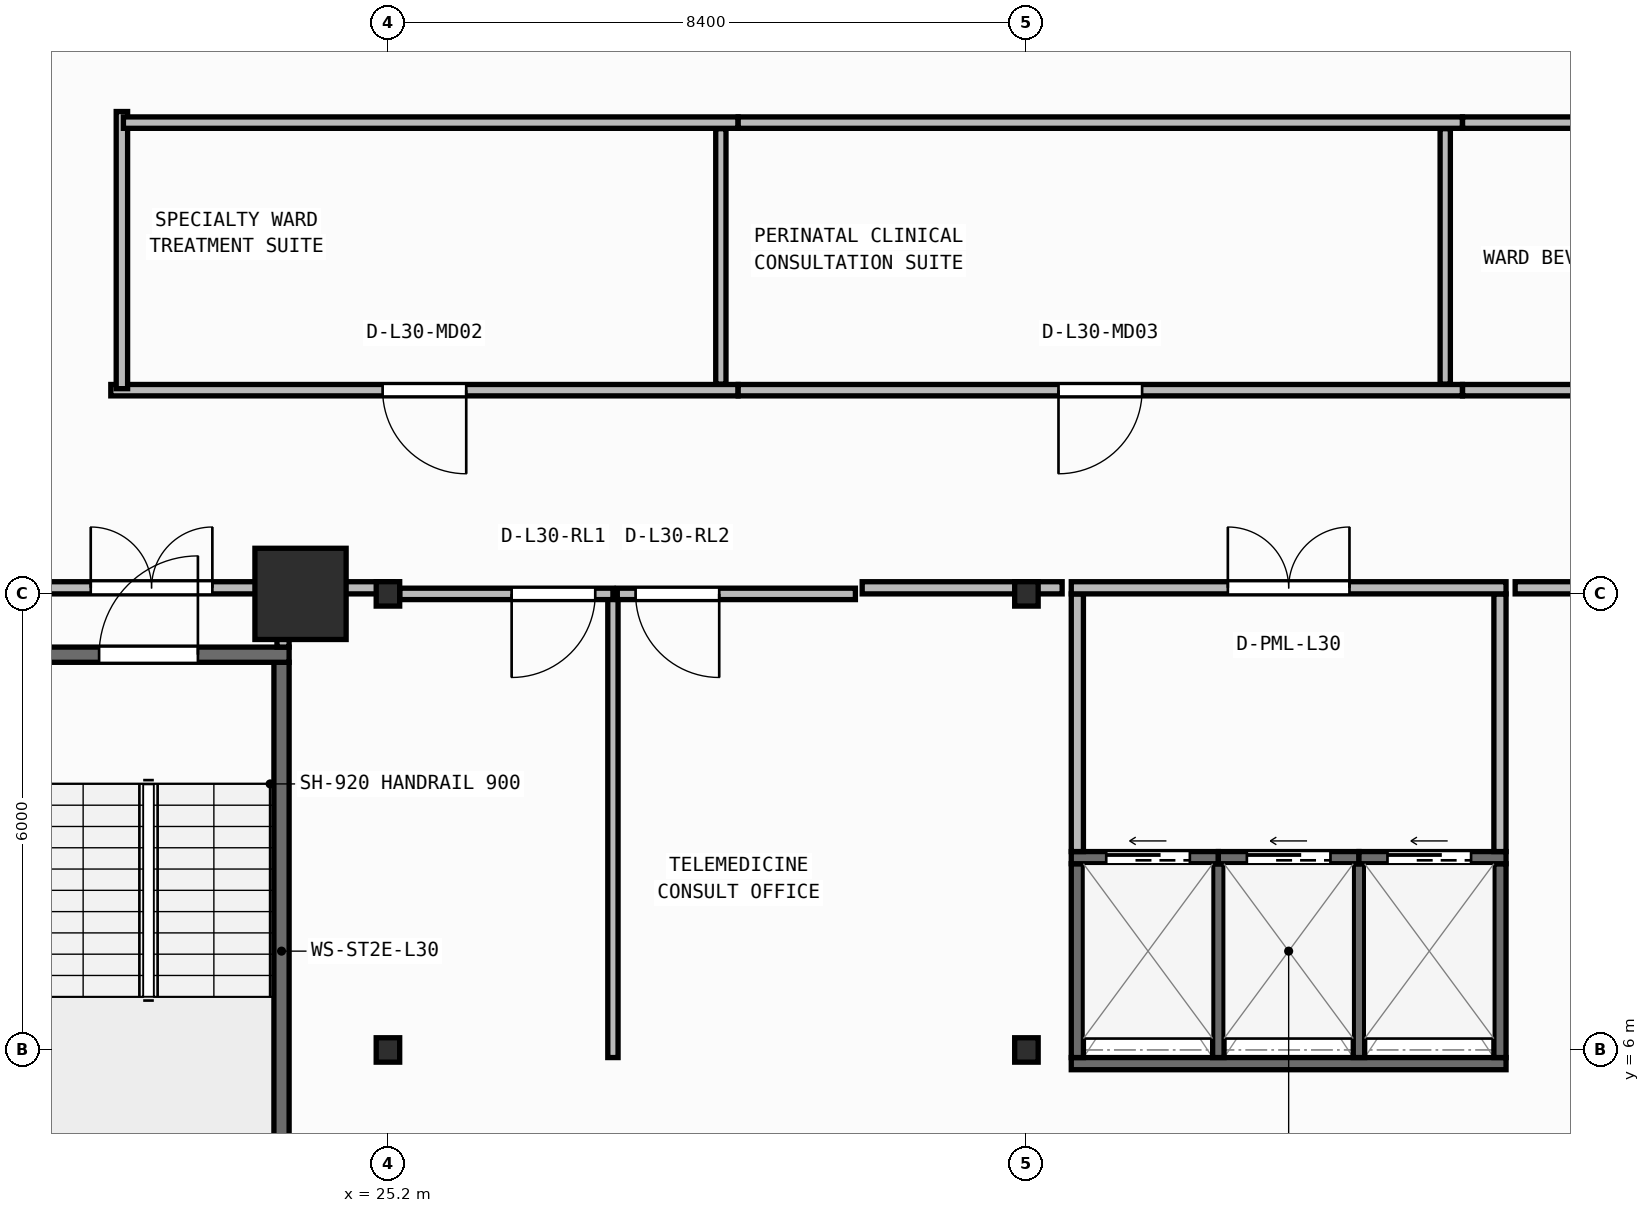
"""IFC4 building model, lengths in metres.
Left out: names, types, materials, properties, quantities, classifications, styles, units other than length and angle.
Written with IfcOpenShell. Run it as: python <this file> out.ifc"""

import sys

from ifc_helpers import new_model, si_unit, direction, frame, frame_2d, origin, origin_2d, place, context, subcontext, project, spatial, rectangle, i_section, extrude, element, fill, save


model = new_model("IFC4")
c1 = context("Model", 3, precision=1e-05, world=origin(), true_north=direction((0.0, 1.0)))
c2 = subcontext(c1, "Body", "Model", "MODEL_VIEW")
j1 = project(units=[si_unit("LENGTHUNIT", "METRE"), si_unit("PLANEANGLEUNIT", "RADIAN")], contexts=[c1])
p1 = place(None, origin())
s1 = spatial("IfcSite", under=j1, at=p1, CompositionType="ELEMENT")
p2 = place(p1, origin())
s2 = spatial("IfcBuilding", under=s1, at=p2, CompositionType="ELEMENT")
p3 = place(p2, frame((0.0, 0.0, 123.1)))
s3 = spatial("IfcBuildingStorey", under=s2, at=p3, CompositionType="ELEMENT", Elevation=123.1)
for number, where, z_axis, x_axis in (
    (1, (25.2, 6.0, 0.0), (0.0, 0.0, 1.0), (1.0, 0.0, 0.0)),
    (2, (33.6, 6.0, 0.0), (0.0, 0.0, 1.0), (1.0, 0.0, 0.0)),
):
    element("IfcColumn", number, at=place(p3, frame(where, z_axis=z_axis, x_axis=x_axis)), inside=s3, PredefinedType="COLUMN", context=c2, shape_type="SweptSolid", body=[
        extrude(i_section(OverallWidth=0.309, OverallDepth=0.321, WebThickness=0.014, FlangeThickness=0.022, FilletRadius=0.017, at=origin_2d()), origin(), (0.0, 0.0, 1.0), 3.95),
    ])
p4 = place(p3, frame((24.05, 12.0, 0.0), z_axis=(0.0, 0.0, 1.0), x_axis=(1.0, 0.0, 0.0)))
e3 = element("IfcColumn", 3, at=p4, inside=s3, PredefinedType="COLUMN", context=c2, shape_type="SweptSolid", body=[
    extrude(rectangle(XDim=1.2, YDim=1.2, at=origin_2d()), origin(), (0.0, 0.0, 1.0), 3.95),
])
for number, where, z_axis, x_axis in (
    (4, (25.2, 12.0, 0.0), (0.0, 0.0, 1.0), (1.0, 0.0, 0.0)),
    (5, (33.6, 12.0, 0.0), (0.0, 0.0, 1.0), (1.0, 0.0, 0.0)),
):
    element("IfcColumn", number, at=place(p3, frame(where, z_axis=z_axis, x_axis=x_axis)), inside=s3, PredefinedType="COLUMN", context=c2, shape_type="SweptSolid", body=[
        extrude(i_section(OverallWidth=0.309, OverallDepth=0.321, WebThickness=0.014, FlangeThickness=0.022, FilletRadius=0.017, at=origin_2d()), origin(), (0.0, 0.0, 1.0), 3.95),
    ])
p5 = place(p3, frame((23.8, 3.5, 0.0), z_axis=(0.0, 0.0, 1.0), x_axis=(0.0, 1.0, 0.0)))
e6 = element("IfcWall", 6, at=p5, inside=s3, PredefinedType="SHEAR", context=c2, shape_type="SweptSolid", body=[
    extrude(rectangle(XDim=7.6, YDim=0.2, at=frame_2d((3.8, 0.0))), origin(), (0.0, 0.0, 1.0), 3.71),
])
p6 = place(p3, frame((20.2, 11.2, 0.0), z_axis=(0.0, 0.0, 1.0), x_axis=(1.0, 0.0, 0.0)))
e7 = element("IfcWall", 7, at=p6, inside=s3, PredefinedType="SHEAR", context=c2, shape_type="SweptSolid", body=[
    extrude(rectangle(XDim=3.7, YDim=0.2, at=frame_2d((1.85, 0.0))), origin(), (0.0, 0.0, 1.0), 3.71),
])
p7 = place(p6, frame((1.2, 0.0, 0.0)))
e8 = element("IfcOpeningElement", 8, at=p7, cuts=e7, PredefinedType="OPENING", context=c2, shape_type="SweptSolid", body=[
    extrude(rectangle(XDim=1.3, YDim=2.15, at=frame_2d((0.65, 1.075))), frame((0.0, 0.11, 0.0), z_axis=(0.0, -1.0, 0.0), x_axis=(1.0, 0.0, 0.0)), (0.0, 0.0, 1.0), 0.22),
])
p8 = place(p3, frame((34.19, 5.82, 0.0), z_axis=(0.0, 0.0, 1.0), x_axis=(1.0, 0.0, 0.0)))
e9 = element("IfcWall", 9, at=p8, inside=s3, PredefinedType="SHEAR", context=c2, shape_type="SweptSolid", body=[
    extrude(rectangle(XDim=5.72, YDim=0.16, at=frame_2d((2.86, 0.0))), origin(), (0.0, 0.0, 1.0), 3.71),
])
for number, where, z_axis, x_axis in (
    (10, (34.27, 5.9, 0.0), (0.0, 0.0, 1.0), (0.0, 1.0, 0.0)),
    (11, (39.83, 5.9, 0.0), (0.0, 0.0, 1.0), (0.0, 1.0, 0.0)),
):
    element("IfcWall", number, at=place(p3, frame(where, z_axis=z_axis, x_axis=x_axis)), inside=s3, PredefinedType="SHEAR", context=c2, shape_type="SweptSolid", body=[
        extrude(rectangle(XDim=2.55, YDim=0.16, at=frame_2d((1.275, 0.0))), origin(), (0.0, 0.0, 1.0), 3.71),
    ])
for number, where, z_axis, x_axis in (
    (12, (36.125, 5.9, 0.0), (0.0, 0.0, 1.0), (0.0, 1.0, 0.0)),
    (13, (37.975, 5.9, 0.0), (0.0, 0.0, 1.0), (0.0, 1.0, 0.0)),
):
    element("IfcWall", number, at=place(p3, frame(where, z_axis=z_axis, x_axis=x_axis)), inside=s3, PredefinedType="SHEAR", context=c2, shape_type="SweptSolid", body=[
        extrude(rectangle(XDim=2.55, YDim=0.15, at=frame_2d((1.275, 0.0))), origin(), (0.0, 0.0, 1.0), 3.71),
    ])
p9 = place(p3, frame((34.19, 8.53, 0.0), z_axis=(0.0, 0.0, 1.0), x_axis=(1.0, 0.0, 0.0)))
e14 = element("IfcWall", 14, at=p9, inside=s3, PredefinedType="SHEAR", context=c2, shape_type="SweptSolid", body=[
    extrude(rectangle(XDim=1.935, YDim=0.16, at=frame_2d((0.968, 0.0))), origin(), (0.0, 0.0, 1.0), 3.71),
])
p10 = place(p9, frame((0.46, 0.0, 0.0)))
e15 = element("IfcOpeningElement", 15, at=p10, cuts=e14, PredefinedType="OPENING", context=c2, shape_type="SweptSolid", body=[
    extrude(rectangle(XDim=1.1, YDim=2.15, at=frame_2d((0.55, 1.075))), frame((0.0, 0.09, 0.0), z_axis=(0.0, -1.0, 0.0), x_axis=(1.0, 0.0, 0.0)), (0.0, 0.0, 1.0), 0.18),
])
p11 = place(p3, frame((36.125, 8.53, 0.0), z_axis=(0.0, 0.0, 1.0), x_axis=(1.0, 0.0, 0.0)))
e16 = element("IfcWall", 16, at=p11, inside=s3, PredefinedType="SHEAR", context=c2, shape_type="SweptSolid", body=[
    extrude(rectangle(XDim=1.85, YDim=0.16, at=frame_2d((0.925, 0.0))), origin(), (0.0, 0.0, 1.0), 3.71),
])
p12 = place(p11, frame((0.375, 0.0, 0.0)))
e17 = element("IfcOpeningElement", 17, at=p12, cuts=e16, PredefinedType="OPENING", context=c2, shape_type="SweptSolid", body=[
    extrude(rectangle(XDim=1.1, YDim=2.15, at=frame_2d((0.55, 1.075))), frame((0.0, 0.09, 0.0), z_axis=(0.0, -1.0, 0.0), x_axis=(1.0, 0.0, 0.0)), (0.0, 0.0, 1.0), 0.18),
])
p13 = place(p3, frame((37.975, 8.53, 0.0), z_axis=(0.0, 0.0, 1.0), x_axis=(1.0, 0.0, 0.0)))
e18 = element("IfcWall", 18, at=p13, inside=s3, PredefinedType="SHEAR", context=c2, shape_type="SweptSolid", body=[
    extrude(rectangle(XDim=1.935, YDim=0.16, at=frame_2d((0.967, 0.0))), origin(), (0.0, 0.0, 1.0), 3.71),
])
p14 = place(p13, frame((0.375, 0.0, 0.0)))
e19 = element("IfcOpeningElement", 19, at=p14, cuts=e18, PredefinedType="OPENING", context=c2, shape_type="SweptSolid", body=[
    extrude(rectangle(XDim=1.1, YDim=2.15, at=frame_2d((0.55, 1.075))), frame((0.0, 0.09, 0.0), z_axis=(0.0, -1.0, 0.0), x_axis=(1.0, 0.0, 0.0)), (0.0, 0.0, 1.0), 0.18),
])
p15 = place(p3, frame((20.28, 12.08, 0.0), z_axis=(0.0, 0.0, 1.0), x_axis=(1.0, 0.0, 0.0)))
e20 = element("IfcWall", 20, at=p15, inside=s3, PredefinedType="PARTITIONING", context=c2, shape_type="SweptSolid", body=[
    extrude(rectangle(XDim=3.62, YDim=0.16, at=frame_2d((1.81, 0.0))), origin(), (0.0, 0.0, 1.0), 3.083),
])
p16 = place(p15, frame((1.01, 0.0, 0.0)))
e21 = element("IfcOpeningElement", 21, at=p16, cuts=e20, PredefinedType="OPENING", context=c2, shape_type="SweptSolid", body=[
    extrude(rectangle(XDim=1.6, YDim=2.05, at=frame_2d((0.8, 1.025))), frame((0.0, 0.09, 0.0), z_axis=(0.0, -1.0, 0.0), x_axis=(1.0, 0.0, 0.0)), (0.0, 0.0, 1.0), 0.18),
])
p17 = place(p3, frame((23.82, 11.3, 0.0), z_axis=(0.0, 0.0, 1.0), x_axis=(0.0, 1.0, 0.0)))
e22 = element("IfcWall", 22, at=p17, inside=s3, PredefinedType="PARTITIONING", context=c2, shape_type="SweptSolid", body=[
    extrude(rectangle(XDim=0.7, YDim=0.16, at=frame_2d((0.35, 0.0))), origin(), (0.0, 0.0, 1.0), 3.71),
])
for number, where, z_axis, x_axis in (
    (23, (34.27, 8.61, 0.0), (0.0, 0.0, 1.0), (0.0, 1.0, 0.0)),
    (24, (39.83, 8.61, 0.0), (0.0, 0.0, 1.0), (0.0, 1.0, 0.0)),
):
    element("IfcWall", number, at=place(p3, frame(where, z_axis=z_axis, x_axis=x_axis)), inside=s3, PredefinedType="PARTITIONING", context=c2, shape_type="SweptSolid", body=[
        extrude(rectangle(XDim=3.39, YDim=0.16, at=frame_2d((1.695, 0.0))), origin(), (0.0, 0.0, 1.0), 3.71),
    ])
p18 = place(p3, frame((34.19, 12.08, 0.0), z_axis=(0.0, 0.0, 1.0), x_axis=(1.0, 0.0, 0.0)))
e25 = element("IfcWall", 25, at=p18, inside=s3, PredefinedType="PARTITIONING", context=c2, shape_type="SweptSolid", body=[
    extrude(rectangle(XDim=5.72, YDim=0.16, at=frame_2d((2.86, 0.0))), origin(), (0.0, 0.0, 1.0), 3.083),
])
p19 = place(p18, frame((2.06, 0.0, 0.0)))
e26 = element("IfcOpeningElement", 26, at=p19, cuts=e25, PredefinedType="OPENING", context=c2, shape_type="SweptSolid", body=[
    extrude(rectangle(XDim=1.6, YDim=2.05, at=frame_2d((0.8, 1.025))), frame((0.0, 0.09, 0.0), z_axis=(0.0, -1.0, 0.0), x_axis=(1.0, 0.0, 0.0)), (0.0, 0.0, 1.0), 0.18),
])
p20 = place(p3, frame((28.16, 5.9, 0.0), z_axis=(0.0, 0.0, 1.0), x_axis=(0.0, 1.0, 0.0)))
e27 = element("IfcWall", 27, at=p20, inside=s3, PredefinedType="PARTITIONING", context=c2, shape_type="SweptSolid", body=[
    extrude(rectangle(XDim=6.1, YDim=0.135, at=frame_2d((3.05, 0.0))), origin(), (0.0, 0.0, 1.0), 3.71),
])
p21 = place(p3, frame((28.16, 12.0, 0.0), z_axis=(0.0, 0.0, 1.0), x_axis=(-1.0, 0.0, 0.0)))
e28 = element("IfcWall", 28, at=p21, inside=s3, PredefinedType="PARTITIONING", context=c2, shape_type="SweptSolid", body=[
    extrude(rectangle(XDim=2.805, YDim=0.15, at=frame_2d((1.403, 0.0))), origin(), (0.0, 0.0, 1.0), 3.083),
])
p22 = place(p21, frame((0.233, 0.0, 0.0)))
e29 = element("IfcOpeningElement", 29, at=p22, cuts=e28, PredefinedType="OPENING", context=c2, shape_type="SweptSolid", body=[
    extrude(rectangle(XDim=1.1, YDim=2.1, at=frame_2d((0.55, 1.05))), frame((0.0, 0.085, 0.0), z_axis=(0.0, -1.0, 0.0), x_axis=(1.0, 0.0, 0.0)), (0.0, 0.0, 1.0), 0.17),
])
p23 = place(p3, frame((31.35, 12.0, 0.0), z_axis=(0.0, 0.0, 1.0), x_axis=(-1.0, 0.0, 0.0)))
e30 = element("IfcWall", 30, at=p23, inside=s3, PredefinedType="PARTITIONING", context=c2, shape_type="SweptSolid", body=[
    extrude(rectangle(XDim=3.133, YDim=0.15, at=frame_2d((1.566, 0.0))), origin(), (0.0, 0.0, 1.0), 3.083),
])
p24 = place(p23, frame((1.792, 0.0, 0.0)))
e31 = element("IfcOpeningElement", 31, at=p24, cuts=e30, PredefinedType="OPENING", context=c2, shape_type="SweptSolid", body=[
    extrude(rectangle(XDim=1.1, YDim=2.1, at=frame_2d((0.55, 1.05))), frame((0.0, 0.085, 0.0), z_axis=(0.0, -1.0, 0.0), x_axis=(1.0, 0.0, 0.0)), (0.0, 0.0, 1.0), 0.17),
])
p25 = place(p3, frame((29.806, 14.68, 0.0), z_axis=(0.0, 0.0, 1.0), x_axis=(-1.0, 0.0, 0.0)))
e32 = element("IfcWall", 32, at=p25, inside=s3, PredefinedType="PARTITIONING", context=c2, shape_type="SweptSolid", body=[
    extrude(rectangle(XDim=8.252, YDim=0.15, at=frame_2d((4.126, 0.0))), origin(), (0.0, 0.0, 1.0), 3.71),
])
p26 = place(p25, frame((3.576, 0.0, 0.0)))
e33 = element("IfcOpeningElement", 33, at=p26, cuts=e32, PredefinedType="OPENING", context=c2, shape_type="SweptSolid", body=[
    extrude(rectangle(XDim=1.1, YDim=2.1, at=frame_2d((0.55, 1.05))), frame((0.0, 0.085, 0.0), z_axis=(0.0, -1.0, 0.0), x_axis=(1.0, 0.0, 0.0)), (0.0, 0.0, 1.0), 0.17),
])
p27 = place(p3, frame((39.336, 14.68, 0.0), z_axis=(0.0, 0.0, 1.0), x_axis=(-1.0, 0.0, 0.0)))
e34 = element("IfcWall", 34, at=p27, inside=s3, PredefinedType="PARTITIONING", context=c2, shape_type="SweptSolid", body=[
    extrude(rectangle(XDim=9.528, YDim=0.15, at=frame_2d((4.764, 0.0))), origin(), (0.0, 0.0, 1.0), 3.71),
])
p28 = place(p27, frame((4.214, 0.0, 0.0)))
e35 = element("IfcOpeningElement", 35, at=p28, cuts=e34, PredefinedType="OPENING", context=c2, shape_type="SweptSolid", body=[
    extrude(rectangle(XDim=1.1, YDim=2.1, at=frame_2d((0.55, 1.05))), frame((0.0, 0.085, 0.0), z_axis=(0.0, -1.0, 0.0), x_axis=(1.0, 0.0, 0.0)), (0.0, 0.0, 1.0), 0.17),
])
p29 = place(p3, frame((51.586, 14.68, 0.0), z_axis=(0.0, 0.0, 1.0), x_axis=(-1.0, 0.0, 0.0)))
e36 = element("IfcWall", 36, at=p29, inside=s3, PredefinedType="PARTITIONING", context=c2, shape_type="SweptSolid", body=[
    extrude(rectangle(XDim=12.248, YDim=0.15, at=frame_2d((6.124, 0.0))), origin(), (0.0, 0.0, 1.0), 3.71),
])
p30 = place(p29, frame((5.574, 0.0, 0.0)))
e37 = element("IfcOpeningElement", 37, at=p30, cuts=e36, PredefinedType="OPENING", context=c2, shape_type="SweptSolid", body=[
    extrude(rectangle(XDim=1.1, YDim=2.1, at=frame_2d((0.55, 1.05))), frame((0.0, 0.085, 0.0), z_axis=(0.0, -1.0, 0.0), x_axis=(1.0, 0.0, 0.0)), (0.0, 0.0, 1.0), 0.17),
])
p31 = place(p3, frame((21.7, 14.7, 0.0), z_axis=(0.0, 0.0, 1.0), x_axis=(0.0, 1.0, 0.0)))
e38 = element("IfcWall", 38, at=p31, inside=s3, PredefinedType="PARTITIONING", context=c2, shape_type="SweptSolid", body=[
    extrude(rectangle(XDim=3.646, YDim=0.15, at=frame_2d((1.823, 0.0))), origin(), (0.0, 0.0, 1.0), 3.71),
])
p32 = place(p3, frame((21.72, 18.2, 0.0), z_axis=(0.0, 0.0, 1.0), x_axis=(1.0, 0.0, 0.0)))
e39 = element("IfcWall", 39, at=p32, inside=s3, PredefinedType="PARTITIONING", context=c2, shape_type="SweptSolid", body=[
    extrude(rectangle(XDim=8.086, YDim=0.15, at=frame_2d((4.043, 0.0))), origin(), (0.0, 0.0, 1.0), 3.71),
])
p33 = place(p3, frame((29.808, 18.2, 0.0), z_axis=(0.0, 0.0, 1.0), x_axis=(1.0, 0.0, 0.0)))
e40 = element("IfcWall", 40, at=p33, inside=s3, PredefinedType="PARTITIONING", context=c2, shape_type="SweptSolid", body=[
    extrude(rectangle(XDim=9.528, YDim=0.15, at=frame_2d((4.764, 0.0))), origin(), (0.0, 0.0, 1.0), 3.71),
])
p34 = place(p3, frame((39.338, 18.2, 0.0), z_axis=(0.0, 0.0, 1.0), x_axis=(1.0, 0.0, 0.0)))
e41 = element("IfcWall", 41, at=p34, inside=s3, PredefinedType="PARTITIONING", context=c2, shape_type="SweptSolid", body=[
    extrude(rectangle(XDim=12.248, YDim=0.15, at=frame_2d((6.124, 0.0))), origin(), (0.0, 0.0, 1.0), 3.71),
])
for number, where, z_axis, x_axis in (
    (42, (29.58, 14.76, 0.0), (0.0, 0.0, 1.0), (0.0, 1.0, 0.0)),
    (43, (39.11, 14.76, 0.0), (0.0, 0.0, 1.0), (0.0, 1.0, 0.0)),
):
    element("IfcWall", number, at=place(p3, frame(where, z_axis=z_axis, x_axis=x_axis)), inside=s3, PredefinedType="PARTITIONING", context=c2, shape_type="SweptSolid", body=[
        extrude(rectangle(XDim=3.36, YDim=0.135, at=frame_2d((1.68, 0.0))), origin(), (0.0, 0.0, 1.0), 3.71),
    ])
p35 = place(p3, frame((24.02, 12.08, 0.0), z_axis=(0.0, 0.0, 1.0), x_axis=(1.0, 0.0, 0.0)))
e44 = element("IfcWall", 44, at=p35, inside=s3, PredefinedType="PARTITIONING", context=c2, shape_type="SweptSolid", body=[
    extrude(rectangle(XDim=1.245, YDim=0.16, at=frame_2d((0.623, 0.0))), origin(), (0.0, 0.0, 1.0), 3.083),
])
p36 = place(p3, frame((31.439, 12.08, 0.0), z_axis=(0.0, 0.0, 1.0), x_axis=(1.0, 0.0, 0.0)))
e45 = element("IfcWall", 45, at=p36, inside=s3, PredefinedType="PARTITIONING", context=c2, shape_type="SweptSolid", body=[
    extrude(rectangle(XDim=2.631, YDim=0.16, at=frame_2d((1.315, 0.0))), origin(), (0.0, 0.0, 1.0), 3.083),
])
p37 = place(p3, frame((40.03, 12.08, 0.0), z_axis=(0.0, 0.0, 1.0), x_axis=(1.0, 0.0, 0.0)))
e46 = element("IfcWall", 46, at=p37, inside=s3, PredefinedType="PARTITIONING", context=c2, shape_type="SweptSolid", body=[
    extrude(rectangle(XDim=2.781, YDim=0.16, at=frame_2d((1.39, 0.0))), origin(), (0.0, 0.0, 1.0), 3.083),
])
p38 = place(p7, origin())
e47 = element("IfcDoor", 47, at=p38, inside=s3, OperationType="SINGLE_SWING_RIGHT", PredefinedType="DOOR", context=c2, shape_type="SweptSolid", body=[
    extrude(rectangle(XDim=1.3, YDim=2.15, at=frame_2d((0.65, 1.075))), frame((0.0, 0.025, 0.0), z_axis=(0.0, -1.0, 0.0), x_axis=(1.0, 0.0, 0.0)), (0.0, 0.0, 1.0), 0.05),
])
fill(e8, e47)
p39 = place(p10, origin())
e48 = element("IfcDoor", 48, at=p39, inside=s3, OperationType="SLIDING_TO_LEFT", PredefinedType="DOOR", context=c2, shape_type="SweptSolid", body=[
    extrude(rectangle(XDim=1.1, YDim=2.15, at=frame_2d((0.55, 1.075))), frame((0.0, 0.025, 0.0), z_axis=(0.0, -1.0, 0.0), x_axis=(1.0, 0.0, 0.0)), (0.0, 0.0, 1.0), 0.05),
])
fill(e15, e48)
p40 = place(p12, origin())
e49 = element("IfcDoor", 49, at=p40, inside=s3, OperationType="SLIDING_TO_LEFT", PredefinedType="DOOR", context=c2, shape_type="SweptSolid", body=[
    extrude(rectangle(XDim=1.1, YDim=2.15, at=frame_2d((0.55, 1.075))), frame((0.0, 0.025, 0.0), z_axis=(0.0, -1.0, 0.0), x_axis=(1.0, 0.0, 0.0)), (0.0, 0.0, 1.0), 0.05),
])
fill(e17, e49)
p41 = place(p14, origin())
e50 = element("IfcDoor", 50, at=p41, inside=s3, OperationType="SLIDING_TO_LEFT", PredefinedType="DOOR", context=c2, shape_type="SweptSolid", body=[
    extrude(rectangle(XDim=1.1, YDim=2.15, at=frame_2d((0.55, 1.075))), frame((0.0, 0.025, 0.0), z_axis=(0.0, -1.0, 0.0), x_axis=(1.0, 0.0, 0.0)), (0.0, 0.0, 1.0), 0.05),
])
fill(e19, e50)
p42 = place(p16, origin())
e51 = element("IfcDoor", 51, at=p42, inside=s3, OperationType="DOUBLE_DOOR_SINGLE_SWING", PredefinedType="DOOR", context=c2, shape_type="SweptSolid", body=[
    extrude(rectangle(XDim=1.6, YDim=2.05, at=frame_2d((0.8, 1.025))), frame((0.0, 0.025, 0.0), z_axis=(0.0, -1.0, 0.0), x_axis=(1.0, 0.0, 0.0)), (0.0, 0.0, 1.0), 0.05),
])
fill(e21, e51)
p43 = place(p19, origin())
e52 = element("IfcDoor", 52, at=p43, inside=s3, OperationType="DOUBLE_DOOR_SINGLE_SWING", PredefinedType="DOOR", context=c2, shape_type="SweptSolid", body=[
    extrude(rectangle(XDim=1.6, YDim=2.05, at=frame_2d((0.8, 1.025))), frame((0.0, 0.025, 0.0), z_axis=(0.0, -1.0, 0.0), x_axis=(1.0, 0.0, 0.0)), (0.0, 0.0, 1.0), 0.05),
])
fill(e26, e52)
p44 = place(p22, origin())
e53 = element("IfcDoor", 53, at=p44, inside=s3, OperationType="SINGLE_SWING_RIGHT", PredefinedType="DOOR", context=c2, shape_type="SweptSolid", body=[
    extrude(rectangle(XDim=1.1, YDim=2.1, at=frame_2d((0.55, 1.05))), frame((0.0, 0.025, 0.0), z_axis=(0.0, -1.0, 0.0), x_axis=(1.0, 0.0, 0.0)), (0.0, 0.0, 1.0), 0.05),
])
fill(e29, e53)
p45 = place(p24, origin())
e54 = element("IfcDoor", 54, at=p45, inside=s3, OperationType="SINGLE_SWING_LEFT", PredefinedType="DOOR", context=c2, shape_type="SweptSolid", body=[
    extrude(rectangle(XDim=1.1, YDim=2.1, at=frame_2d((0.55, 1.05))), frame((0.0, 0.025, 0.0), z_axis=(0.0, -1.0, 0.0), x_axis=(1.0, 0.0, 0.0)), (0.0, 0.0, 1.0), 0.05),
])
fill(e31, e54)
p46 = place(p26, origin())
e55 = element("IfcDoor", 55, at=p46, inside=s3, OperationType="SINGLE_SWING_LEFT", PredefinedType="DOOR", context=c2, shape_type="SweptSolid", body=[
    extrude(rectangle(XDim=1.1, YDim=2.1, at=frame_2d((0.55, 1.05))), frame((0.0, 0.025, 0.0), z_axis=(0.0, -1.0, 0.0), x_axis=(1.0, 0.0, 0.0)), (0.0, 0.0, 1.0), 0.05),
])
fill(e33, e55)
p47 = place(p28, origin())
e56 = element("IfcDoor", 56, at=p47, inside=s3, OperationType="SINGLE_SWING_RIGHT", PredefinedType="DOOR", context=c2, shape_type="SweptSolid", body=[
    extrude(rectangle(XDim=1.1, YDim=2.1, at=frame_2d((0.55, 1.05))), frame((0.0, 0.025, 0.0), z_axis=(0.0, -1.0, 0.0), x_axis=(1.0, 0.0, 0.0)), (0.0, 0.0, 1.0), 0.05),
])
fill(e35, e56)
save(model, sys.argv[1])
